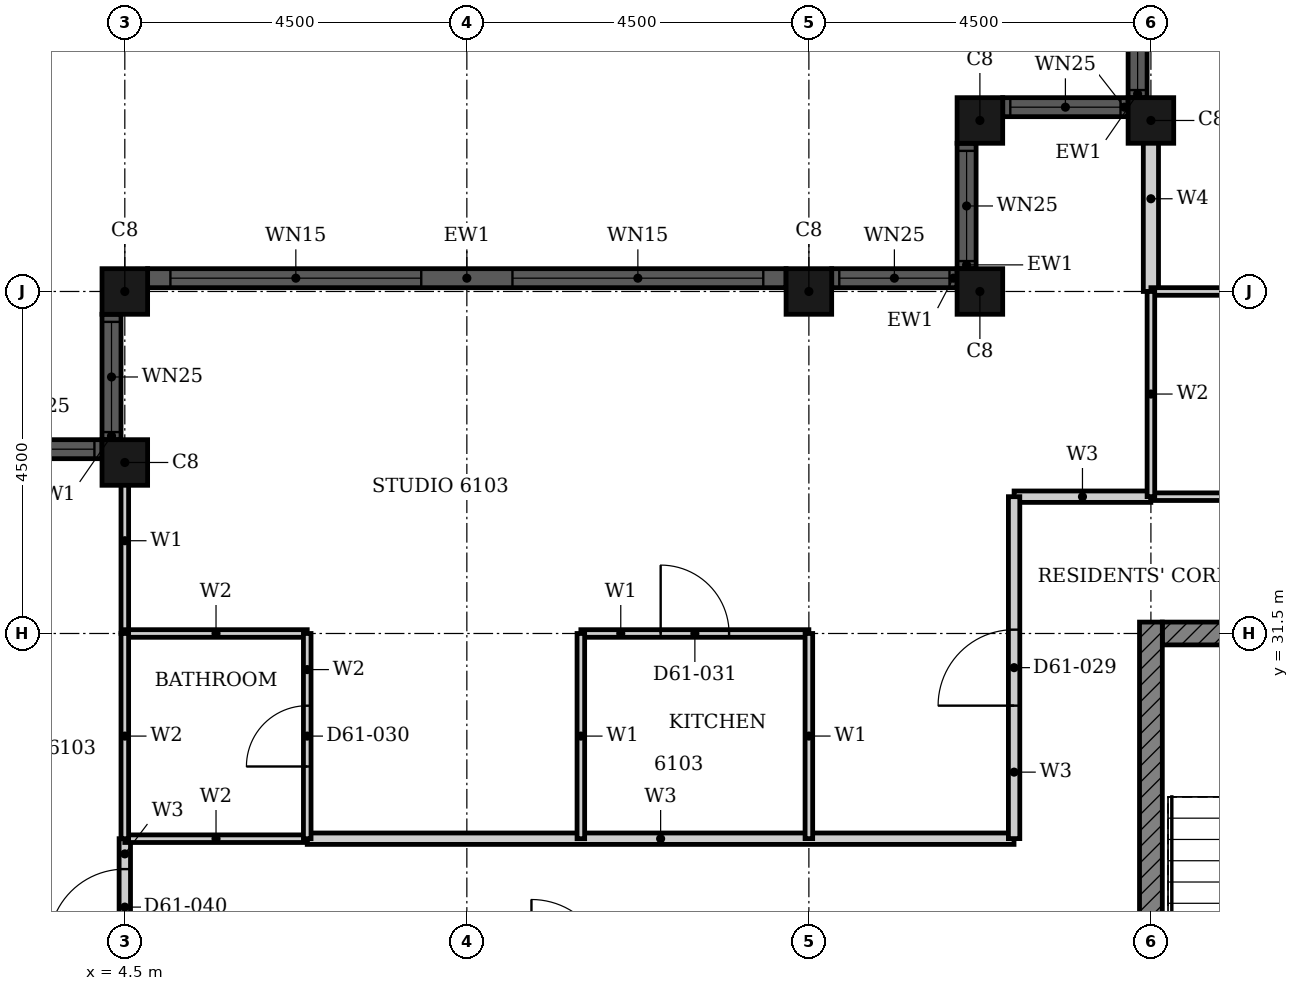
"""IFC4 building model, lengths in metres.
Left out: names, types, materials, properties, quantities, classifications, styles, units other than length and angle.
Written with IfcOpenShell. Run it as: python <this file> out.ifc"""

import sys

from ifc_helpers import new_model, si_unit, direction, frame, frame_2d, origin, origin_2d, place, context, subcontext, project, spatial, rectangle, hollow_rectangle, extrude, element, fill, save


model = new_model("IFC4")
c1 = context("Model", 3, precision=1e-05, world=origin(), true_north=direction((0.0, 1.0)))
c2 = subcontext(c1, "Body", "Model", "MODEL_VIEW")
j1 = project(units=[si_unit("LENGTHUNIT", "METRE"), si_unit("PLANEANGLEUNIT", "RADIAN")], contexts=[c1])
p1 = place(None, origin())
s1 = spatial("IfcSite", under=j1, at=p1, CompositionType="ELEMENT")
p2 = place(p1, origin())
s2 = spatial("IfcBuilding", under=s1, at=p2, CompositionType="ELEMENT")
p3 = place(p2, frame((0.0, 0.0, 241.6)))
s3 = spatial("IfcBuildingStorey", under=s2, at=p3, CompositionType="ELEMENT", Elevation=241.6)
for number, where, z_axis, x_axis in (
    (1, (18.0, 38.25, 0.0), (0.0, 0.0, 1.0), (1.0, 0.0, 0.0)),
    (2, (15.75, 38.25, 0.0), (0.0, 0.0, 1.0), (1.0, 0.0, 0.0)),
    (3, (15.75, 36.0, 0.0), (0.0, 0.0, 1.0), (1.0, 0.0, 0.0)),
    (4, (13.5, 36.0, 0.0), (0.0, 0.0, 1.0), (1.0, 0.0, 0.0)),
    (5, (4.5, 36.0, 0.0), (0.0, 0.0, 1.0), (1.0, 0.0, 0.0)),
    (6, (4.5, 33.75, 0.0), (0.0, 0.0, 1.0), (1.0, 0.0, 0.0)),
):
    element("IfcColumn", number, at=place(p3, frame(where, z_axis=z_axis, x_axis=x_axis)), inside=s3, PredefinedType="COLUMN", context=c2, shape_type="SweptSolid", body=[
        extrude(hollow_rectangle(XDim=0.6, YDim=0.6, WallThickness=0.02, at=origin_2d()), origin(), (0.0, 0.0, 1.0), 3.7),
    ])
p4 = place(p3, frame((17.825, 40.2, 0.0), z_axis=(0.0, 0.0, 1.0), x_axis=(0.0, -1.0, 0.0)))
e7 = element("IfcWall", 7, at=p4, inside=s3, PredefinedType="SOLIDWALL", context=c2, shape_type="SweptSolid", body=[
    extrude(rectangle(XDim=1.65, YDim=0.25, at=frame_2d((0.825, 0.0))), origin(), (0.0, 0.0, 1.0), 3.7),
])
p5 = place(p4, frame((0.1, 0.0, 0.9)))
e8 = element("IfcOpeningElement", 8, at=p5, cuts=e7, PredefinedType="OPENING", context=c2, shape_type="SweptSolid", body=[
    extrude(rectangle(XDim=1.45, YDim=1.85, at=frame_2d((0.725, 0.925))), frame((0.0, 0.135, 0.0), z_axis=(0.0, -1.0, 0.0), x_axis=(1.0, 0.0, 0.0)), (0.0, 0.0, 1.0), 0.27),
])
p6 = place(p3, frame((17.7, 38.425, 0.0), z_axis=(0.0, 0.0, 1.0), x_axis=(-1.0, 0.0, 0.0)))
e9 = element("IfcWall", 9, at=p6, inside=s3, PredefinedType="SOLIDWALL", context=c2, shape_type="SweptSolid", body=[
    extrude(rectangle(XDim=1.65, YDim=0.25, at=frame_2d((0.825, 0.0))), origin(), (0.0, 0.0, 1.0), 3.7),
])
p7 = place(p6, frame((0.1, 0.0, 0.9)))
e10 = element("IfcOpeningElement", 10, at=p7, cuts=e9, PredefinedType="OPENING", context=c2, shape_type="SweptSolid", body=[
    extrude(rectangle(XDim=1.45, YDim=1.85, at=frame_2d((0.725, 0.925))), frame((0.0, 0.135, 0.0), z_axis=(0.0, -1.0, 0.0), x_axis=(1.0, 0.0, 0.0)), (0.0, 0.0, 1.0), 0.27),
])
p8 = place(p3, frame((15.575, 37.95, 0.0), z_axis=(0.0, 0.0, 1.0), x_axis=(0.0, -1.0, 0.0)))
e11 = element("IfcWall", 11, at=p8, inside=s3, PredefinedType="SOLIDWALL", context=c2, shape_type="SweptSolid", body=[
    extrude(rectangle(XDim=1.65, YDim=0.25, at=frame_2d((0.825, 0.0))), origin(), (0.0, 0.0, 1.0), 3.7),
])
p9 = place(p8, frame((0.1, 0.0, 0.9)))
e12 = element("IfcOpeningElement", 12, at=p9, cuts=e11, PredefinedType="OPENING", context=c2, shape_type="SweptSolid", body=[
    extrude(rectangle(XDim=1.45, YDim=1.85, at=frame_2d((0.725, 0.925))), frame((0.0, 0.135, 0.0), z_axis=(0.0, -1.0, 0.0), x_axis=(1.0, 0.0, 0.0)), (0.0, 0.0, 1.0), 0.27),
])
p10 = place(p3, frame((15.45, 36.175, 0.0), z_axis=(0.0, 0.0, 1.0), x_axis=(-1.0, 0.0, 0.0)))
e13 = element("IfcWall", 13, at=p10, inside=s3, PredefinedType="SOLIDWALL", context=c2, shape_type="SweptSolid", body=[
    extrude(rectangle(XDim=1.65, YDim=0.25, at=frame_2d((0.825, 0.0))), origin(), (0.0, 0.0, 1.0), 3.7),
])
p11 = place(p10, frame((0.1, 0.0, 0.9)))
e14 = element("IfcOpeningElement", 14, at=p11, cuts=e13, PredefinedType="OPENING", context=c2, shape_type="SweptSolid", body=[
    extrude(rectangle(XDim=1.45, YDim=1.85, at=frame_2d((0.725, 0.925))), frame((0.0, 0.135, 0.0), z_axis=(0.0, -1.0, 0.0), x_axis=(1.0, 0.0, 0.0)), (0.0, 0.0, 1.0), 0.27),
])
p12 = place(p3, frame((13.2, 36.175, 0.0), z_axis=(0.0, 0.0, 1.0), x_axis=(-1.0, 0.0, 0.0)))
e15 = element("IfcWall", 15, at=p12, inside=s3, PredefinedType="SOLIDWALL", context=c2, shape_type="SweptSolid", body=[
    extrude(rectangle(XDim=8.4, YDim=0.25, at=frame_2d((4.2, 0.0))), origin(), (0.0, 0.0, 1.0), 3.7),
])
p13 = place(p12, frame((0.3, 0.0, 0.45)))
e16 = element("IfcOpeningElement", 16, at=p13, cuts=e15, PredefinedType="OPENING", context=c2, shape_type="SweptSolid", body=[
    extrude(rectangle(XDim=3.3, YDim=2.3, at=frame_2d((1.65, 1.15))), frame((0.0, 0.135, 0.0), z_axis=(0.0, -1.0, 0.0), x_axis=(1.0, 0.0, 0.0)), (0.0, 0.0, 1.0), 0.27),
])
p14 = place(p12, frame((4.8, 0.0, 0.45)))
e17 = element("IfcOpeningElement", 17, at=p14, cuts=e15, PredefinedType="OPENING", context=c2, shape_type="SweptSolid", body=[
    extrude(rectangle(XDim=3.3, YDim=2.3, at=frame_2d((1.65, 1.15))), frame((0.0, 0.135, 0.0), z_axis=(0.0, -1.0, 0.0), x_axis=(1.0, 0.0, 0.0)), (0.0, 0.0, 1.0), 0.27),
])
p15 = place(p3, frame((4.325, 35.7, 0.0), z_axis=(0.0, 0.0, 1.0), x_axis=(0.0, -1.0, 0.0)))
e18 = element("IfcWall", 18, at=p15, inside=s3, PredefinedType="SOLIDWALL", context=c2, shape_type="SweptSolid", body=[
    extrude(rectangle(XDim=1.65, YDim=0.25, at=frame_2d((0.825, 0.0))), origin(), (0.0, 0.0, 1.0), 3.7),
])
p16 = place(p15, frame((0.1, 0.0, 0.9)))
e19 = element("IfcOpeningElement", 19, at=p16, cuts=e18, PredefinedType="OPENING", context=c2, shape_type="SweptSolid", body=[
    extrude(rectangle(XDim=1.45, YDim=1.85, at=frame_2d((0.725, 0.925))), frame((0.0, 0.135, 0.0), z_axis=(0.0, -1.0, 0.0), x_axis=(1.0, 0.0, 0.0)), (0.0, 0.0, 1.0), 0.27),
])
p17 = place(p3, frame((4.2, 33.925, 0.0), z_axis=(0.0, 0.0, 1.0), x_axis=(-1.0, 0.0, 0.0)))
e20 = element("IfcWall", 20, at=p17, inside=s3, PredefinedType="SOLIDWALL", context=c2, shape_type="SweptSolid", body=[
    extrude(rectangle(XDim=1.65, YDim=0.25, at=frame_2d((0.825, 0.0))), origin(), (0.0, 0.0, 1.0), 3.7),
])
p18 = place(p17, frame((0.1, 0.0, 0.9)))
e21 = element("IfcOpeningElement", 21, at=p18, cuts=e20, PredefinedType="OPENING", context=c2, shape_type="SweptSolid", body=[
    extrude(rectangle(XDim=1.45, YDim=1.85, at=frame_2d((0.725, 0.925))), frame((0.0, 0.135, 0.0), z_axis=(0.0, -1.0, 0.0), x_axis=(1.0, 0.0, 0.0)), (0.0, 0.0, 1.0), 0.27),
])
p19 = place(p3, frame((18.15, 31.5, 0.0), z_axis=(0.0, 0.0, 1.0), x_axis=(1.0, 0.0, 0.0)))
e22 = element("IfcWall", 22, at=p19, inside=s3, PredefinedType="SHEAR", context=c2, shape_type="SweptSolid", body=[
    extrude(rectangle(XDim=9.368, YDim=0.3, at=frame_2d((4.684, 0.0))), origin(), (0.0, 0.0, 1.0), 3.4),
])
p20 = place(p19, frame((4.736, 0.0, 0.0)))
e23 = element("IfcOpeningElement", 23, at=p20, cuts=e22, PredefinedType="OPENING", context=c2, shape_type="SweptSolid", body=[
    extrude(rectangle(XDim=1.8, YDim=2.1, at=frame_2d((0.9, 1.05))), frame((0.0, 0.16, 0.0), z_axis=(0.0, -1.0, 0.0), x_axis=(1.0, 0.0, 0.0)), (0.0, 0.0, 1.0), 0.32),
])
p21 = place(p3, frame((18.0, 22.35, 0.0), z_axis=(0.0, 0.0, 1.0), x_axis=(0.0, 1.0, 0.0)))
e24 = element("IfcWall", 24, at=p21, inside=s3, PredefinedType="SHEAR", context=c2, shape_type="SweptSolid", body=[
    extrude(rectangle(XDim=9.3, YDim=0.3, at=frame_2d((4.65, 0.0))), origin(), (0.0, 0.0, 1.0), 3.4),
])
p22 = place(p3, frame((6.9, 28.8, 0.0), z_axis=(0.0, 0.0, 1.0), x_axis=(1.0, 0.0, 0.0)))
e25 = element("IfcWall", 25, at=p22, inside=s3, PredefinedType="PARTITIONING", context=c2, shape_type="SweptSolid", body=[
    extrude(rectangle(XDim=9.299, YDim=0.15, at=frame_2d((4.649, 0.0))), origin(), (0.0, 0.0, 1.0), 3.4),
])
p23 = place(p3, frame((16.2, 33.3, 0.0), z_axis=(0.0, 0.0, 1.0), x_axis=(1.0, 0.0, 0.0)))
e26 = element("IfcWall", 26, at=p23, inside=s3, PredefinedType="PARTITIONING", context=c2, shape_type="SweptSolid", body=[
    extrude(rectangle(XDim=1.799, YDim=0.15, at=frame_2d((0.899, 0.0))), origin(), (0.0, 0.0, 1.0), 3.4),
])
p24 = place(p3, frame((16.2, 28.801, 0.0), z_axis=(0.0, 0.0, 1.0), x_axis=(0.0, 1.0, 0.0)))
e27 = element("IfcWall", 27, at=p24, inside=s3, PredefinedType="PARTITIONING", context=c2, shape_type="SweptSolid", body=[
    extrude(rectangle(XDim=4.499, YDim=0.15, at=frame_2d((2.25, 0.0))), origin(), (0.0, 0.0, 1.0), 3.4),
])
p25 = place(p24, frame((1.75, 0.0, 0.0)))
e28 = element("IfcOpeningElement", 28, at=p25, cuts=e27, PredefinedType="OPENING", context=c2, shape_type="SweptSolid", body=[
    extrude(rectangle(XDim=1.0, YDim=2.2, at=frame_2d((0.5, 1.1))), frame((0.0, 0.085, 0.0), z_axis=(0.0, -1.0, 0.0), x_axis=(1.0, 0.0, 0.0)), (0.0, 0.0, 1.0), 0.17),
])
p26 = place(p3, frame((4.5, 27.0, 0.0), z_axis=(0.0, 0.0, 1.0), x_axis=(0.0, 1.0, 0.0)))
e29 = element("IfcWall", 29, at=p26, inside=s3, PredefinedType="PARTITIONING", context=c2, shape_type="SweptSolid", body=[
    extrude(rectangle(XDim=1.8, YDim=0.15, at=frame_2d((0.9, 0.0))), origin(), (0.0, 0.0, 1.0), 3.4),
])
p27 = place(p26, frame((0.4, 0.0, 0.0)))
e30 = element("IfcOpeningElement", 30, at=p27, cuts=e29, PredefinedType="OPENING", context=c2, shape_type="SweptSolid", body=[
    extrude(rectangle(XDim=1.0, YDim=2.1, at=frame_2d((0.5, 1.05))), frame((0.0, 0.085, 0.0), z_axis=(0.0, -1.0, 0.0), x_axis=(1.0, 0.0, 0.0)), (0.0, 0.0, 1.0), 0.17),
])
p28 = place(p3, frame((10.5, 31.5, 0.0), z_axis=(0.0, 0.0, 1.0), x_axis=(1.0, 0.0, 0.0)))
e31 = element("IfcWall", 31, at=p28, inside=s3, PredefinedType="PARTITIONING", context=c2, shape_type="SweptSolid", body=[
    extrude(rectangle(XDim=3.0, YDim=0.1, at=frame_2d((1.5, 0.0))), origin(), (0.0, 0.0, 1.0), 2.68),
])
p29 = place(p28, frame((1.05, 0.0, 0.0)))
e32 = element("IfcOpeningElement", 32, at=p29, cuts=e31, PredefinedType="OPENING", context=c2, shape_type="SweptSolid", body=[
    extrude(rectangle(XDim=0.9, YDim=2.1, at=frame_2d((0.45, 1.05))), frame((0.0, 0.06, 0.0), z_axis=(0.0, -1.0, 0.0), x_axis=(1.0, 0.0, 0.0)), (0.0, 0.0, 1.0), 0.12),
])
p30 = place(p3, frame((10.5, 28.8, 0.0), z_axis=(0.0, 0.0, 1.0), x_axis=(0.0, 1.0, 0.0)))
e33 = element("IfcWall", 33, at=p30, inside=s3, PredefinedType="PARTITIONING", context=c2, shape_type="SweptSolid", body=[
    extrude(rectangle(XDim=2.7, YDim=0.1, at=frame_2d((1.35, 0.0))), origin(), (0.0, 0.0, 1.0), 3.4),
])
p31 = place(p3, frame((13.5, 28.801, 0.0), z_axis=(0.0, 0.0, 1.0), x_axis=(0.0, 1.0, 0.0)))
e34 = element("IfcWall", 34, at=p31, inside=s3, PredefinedType="PARTITIONING", context=c2, shape_type="SweptSolid", body=[
    extrude(rectangle(XDim=2.699, YDim=0.1, at=frame_2d((1.35, 0.0))), origin(), (0.0, 0.0, 1.0), 2.48),
])
p32 = place(p3, frame((4.5, 31.501, 0.0), z_axis=(0.0, 0.0, 1.0), x_axis=(0.0, 1.0, 0.0)))
e35 = element("IfcWall", 35, at=p32, inside=s3, PredefinedType="PARTITIONING", context=c2, shape_type="SweptSolid", body=[
    extrude(rectangle(XDim=2.439, YDim=0.1, at=frame_2d((1.219, 0.0))), origin(), (0.0, 0.0, 1.0), 3.4),
])
p33 = place(p3, frame((18.0, 36.0, 0.0), z_axis=(0.0, 0.0, 1.0), x_axis=(0.0, 1.0, 0.0)))
e36 = element("IfcWall", 36, at=p33, inside=s3, PredefinedType="PARTITIONING", context=c2, shape_type="SweptSolid", body=[
    extrude(rectangle(XDim=2.44, YDim=0.2, at=frame_2d((1.22, 0.0))), origin(), (0.0, 0.0, 1.0), 3.4),
])
p34 = place(p3, frame((4.5, 28.8, 0.0), z_axis=(0.0, 0.0, 1.0), x_axis=(1.0, 0.0, 0.0)))
e37 = element("IfcWall", 37, at=p34, inside=s3, PredefinedType="PARTITIONING", context=c2, shape_type="SweptSolid", body=[
    extrude(rectangle(XDim=2.4, YDim=0.1, at=frame_2d((1.2, 0.0))), origin(), (0.0, 0.0, 1.0), 3.4),
])
p35 = place(p3, frame((4.5, 31.5, 0.0), z_axis=(0.0, 0.0, 1.0), x_axis=(1.0, 0.0, 0.0)))
e38 = element("IfcWall", 38, at=p35, inside=s3, PredefinedType="PARTITIONING", context=c2, shape_type="SweptSolid", body=[
    extrude(rectangle(XDim=2.4, YDim=0.1, at=frame_2d((1.2, 0.0))), origin(), (0.0, 0.0, 1.0), 2.68),
])
p36 = place(p3, frame((18.0, 33.3, 0.0), z_axis=(0.0, 0.0, 1.0), x_axis=(1.0, 0.0, 0.0)))
e39 = element("IfcWall", 39, at=p36, inside=s3, PredefinedType="PARTITIONING", context=c2, shape_type="SweptSolid", body=[
    extrude(rectangle(XDim=3.6, YDim=0.1, at=frame_2d((1.8, 0.0))), origin(), (0.0, 0.0, 1.0), 3.4),
])
p37 = place(p3, frame((18.0, 36.0, 0.0), z_axis=(0.0, 0.0, 1.0), x_axis=(1.0, 0.0, 0.0)))
e40 = element("IfcWall", 40, at=p37, inside=s3, PredefinedType="PARTITIONING", context=c2, shape_type="SweptSolid", body=[
    extrude(rectangle(XDim=3.6, YDim=0.1, at=frame_2d((1.8, 0.0))), origin(), (0.0, 0.0, 1.0), 3.4),
])
p38 = place(p37, frame((1.4, 0.0, 0.0)))
e41 = element("IfcOpeningElement", 41, at=p38, cuts=e40, PredefinedType="OPENING", context=c2, shape_type="SweptSolid", body=[
    extrude(rectangle(XDim=0.8, YDim=2.1, at=frame_2d((0.4, 1.05))), frame((0.0, 0.06, 0.0), z_axis=(0.0, -1.0, 0.0), x_axis=(1.0, 0.0, 0.0)), (0.0, 0.0, 1.0), 0.12),
])
p39 = place(p3, frame((18.0, 33.301, 0.0), z_axis=(0.0, 0.0, 1.0), x_axis=(0.0, 1.0, 0.0)))
e42 = element("IfcWall", 42, at=p39, inside=s3, PredefinedType="PARTITIONING", context=c2, shape_type="SweptSolid", body=[
    extrude(rectangle(XDim=2.699, YDim=0.1, at=frame_2d((1.35, 0.0))), origin(), (0.0, 0.0, 1.0), 3.4),
])
p40 = place(p3, frame((4.5, 28.8, 0.0), z_axis=(0.0, 0.0, 1.0), x_axis=(0.0, 1.0, 0.0)))
e43 = element("IfcWall", 43, at=p40, inside=s3, PredefinedType="PARTITIONING", context=c2, shape_type="SweptSolid", body=[
    extrude(rectangle(XDim=2.7, YDim=0.1, at=frame_2d((1.35, 0.0))), origin(), (0.0, 0.0, 1.0), 3.4),
])
p41 = place(p3, frame((6.9, 28.8, 0.0), z_axis=(0.0, 0.0, 1.0), x_axis=(0.0, 1.0, 0.0)))
e44 = element("IfcWall", 44, at=p41, inside=s3, PredefinedType="PARTITIONING", context=c2, shape_type="SweptSolid", body=[
    extrude(rectangle(XDim=2.7, YDim=0.1, at=frame_2d((1.35, 0.0))), origin(), (0.0, 0.0, 1.0), 3.4),
])
p42 = place(p41, frame((0.95, 0.0, 0.0)))
e45 = element("IfcOpeningElement", 45, at=p42, cuts=e44, PredefinedType="OPENING", context=c2, shape_type="SweptSolid", body=[
    extrude(rectangle(XDim=0.8, YDim=2.1, at=frame_2d((0.4, 1.05))), frame((0.0, 0.06, 0.0), z_axis=(0.0, -1.0, 0.0), x_axis=(1.0, 0.0, 0.0)), (0.0, 0.0, 1.0), 0.12),
])
p43 = place(p5, origin())
e46 = element("IfcWindow", 46, at=p43, inside=s3, PartitioningType="SINGLE_PANEL", PredefinedType="WINDOW", context=c2, shape_type="SweptSolid", body=[
    extrude(rectangle(XDim=1.45, YDim=1.85, at=frame_2d((0.725, 0.925))), frame((0.0, 0.03, 0.0), z_axis=(0.0, -1.0, 0.0), x_axis=(1.0, 0.0, 0.0)), (0.0, 0.0, 1.0), 0.06),
])
fill(e8, e46)
p44 = place(p7, origin())
e47 = element("IfcWindow", 47, at=p44, inside=s3, PartitioningType="SINGLE_PANEL", PredefinedType="WINDOW", context=c2, shape_type="SweptSolid", body=[
    extrude(rectangle(XDim=1.45, YDim=1.85, at=frame_2d((0.725, 0.925))), frame((0.0, 0.03, 0.0), z_axis=(0.0, -1.0, 0.0), x_axis=(1.0, 0.0, 0.0)), (0.0, 0.0, 1.0), 0.06),
])
fill(e10, e47)
p45 = place(p9, origin())
e48 = element("IfcWindow", 48, at=p45, inside=s3, PartitioningType="SINGLE_PANEL", PredefinedType="WINDOW", context=c2, shape_type="SweptSolid", body=[
    extrude(rectangle(XDim=1.45, YDim=1.85, at=frame_2d((0.725, 0.925))), frame((0.0, 0.03, 0.0), z_axis=(0.0, -1.0, 0.0), x_axis=(1.0, 0.0, 0.0)), (0.0, 0.0, 1.0), 0.06),
])
fill(e12, e48)
p46 = place(p11, origin())
e49 = element("IfcWindow", 49, at=p46, inside=s3, PartitioningType="SINGLE_PANEL", PredefinedType="WINDOW", context=c2, shape_type="SweptSolid", body=[
    extrude(rectangle(XDim=1.45, YDim=1.85, at=frame_2d((0.725, 0.925))), frame((0.0, 0.03, 0.0), z_axis=(0.0, -1.0, 0.0), x_axis=(1.0, 0.0, 0.0)), (0.0, 0.0, 1.0), 0.06),
])
fill(e14, e49)
p47 = place(p13, origin())
e50 = element("IfcWindow", 50, at=p47, inside=s3, PartitioningType="SINGLE_PANEL", PredefinedType="WINDOW", context=c2, shape_type="SweptSolid", body=[
    extrude(rectangle(XDim=3.3, YDim=2.3, at=frame_2d((1.65, 1.15))), frame((0.0, 0.03, 0.0), z_axis=(0.0, -1.0, 0.0), x_axis=(1.0, 0.0, 0.0)), (0.0, 0.0, 1.0), 0.06),
])
fill(e16, e50)
p48 = place(p14, origin())
e51 = element("IfcWindow", 51, at=p48, inside=s3, PartitioningType="SINGLE_PANEL", PredefinedType="WINDOW", context=c2, shape_type="SweptSolid", body=[
    extrude(rectangle(XDim=3.3, YDim=2.3, at=frame_2d((1.65, 1.15))), frame((0.0, 0.03, 0.0), z_axis=(0.0, -1.0, 0.0), x_axis=(1.0, 0.0, 0.0)), (0.0, 0.0, 1.0), 0.06),
])
fill(e17, e51)
p49 = place(p16, origin())
e52 = element("IfcWindow", 52, at=p49, inside=s3, PartitioningType="SINGLE_PANEL", PredefinedType="WINDOW", context=c2, shape_type="SweptSolid", body=[
    extrude(rectangle(XDim=1.45, YDim=1.85, at=frame_2d((0.725, 0.925))), frame((0.0, 0.03, 0.0), z_axis=(0.0, -1.0, 0.0), x_axis=(1.0, 0.0, 0.0)), (0.0, 0.0, 1.0), 0.06),
])
fill(e19, e52)
p50 = place(p18, origin())
e53 = element("IfcWindow", 53, at=p50, inside=s3, PartitioningType="SINGLE_PANEL", PredefinedType="WINDOW", context=c2, shape_type="SweptSolid", body=[
    extrude(rectangle(XDim=1.45, YDim=1.85, at=frame_2d((0.725, 0.925))), frame((0.0, 0.03, 0.0), z_axis=(0.0, -1.0, 0.0), x_axis=(1.0, 0.0, 0.0)), (0.0, 0.0, 1.0), 0.06),
])
fill(e21, e53)
p51 = place(p25, origin())
e54 = element("IfcDoor", 54, at=p51, inside=s3, OperationType="SINGLE_SWING_LEFT", PredefinedType="DOOR", context=c2, shape_type="SweptSolid", body=[
    extrude(rectangle(XDim=1.0, YDim=2.2, at=frame_2d((0.5, 1.1))), frame((0.0, 0.025, 0.0), z_axis=(0.0, -1.0, 0.0), x_axis=(1.0, 0.0, 0.0)), (0.0, 0.0, 1.0), 0.05),
])
fill(e28, e54)
p52 = place(p42, origin())
e55 = element("IfcDoor", 55, at=p52, inside=s3, OperationType="SINGLE_SWING_LEFT", PredefinedType="DOOR", context=c2, shape_type="SweptSolid", body=[
    extrude(rectangle(XDim=0.8, YDim=2.1, at=frame_2d((0.4, 1.05))), frame((0.0, 0.025, 0.0), z_axis=(0.0, -1.0, 0.0), x_axis=(1.0, 0.0, 0.0)), (0.0, 0.0, 1.0), 0.05),
])
fill(e45, e55)
p53 = place(p29, origin())
e56 = element("IfcDoor", 56, at=p53, inside=s3, OperationType="SINGLE_SWING_RIGHT", PredefinedType="DOOR", context=c2, shape_type="SweptSolid", body=[
    extrude(rectangle(XDim=0.9, YDim=2.1, at=frame_2d((0.45, 1.05))), frame((0.0, 0.025, 0.0), z_axis=(0.0, -1.0, 0.0), x_axis=(1.0, 0.0, 0.0)), (0.0, 0.0, 1.0), 0.05),
])
fill(e32, e56)
p54 = place(p27, origin())
e57 = element("IfcDoor", 57, at=p54, inside=s3, OperationType="SINGLE_SWING_LEFT", PredefinedType="DOOR", context=c2, shape_type="SweptSolid", body=[
    extrude(rectangle(XDim=1.0, YDim=2.1, at=frame_2d((0.5, 1.05))), frame((0.0, 0.025, 0.0), z_axis=(0.0, -1.0, 0.0), x_axis=(1.0, 0.0, 0.0)), (0.0, 0.0, 1.0), 0.05),
])
fill(e30, e57)
save(model, sys.argv[1])
